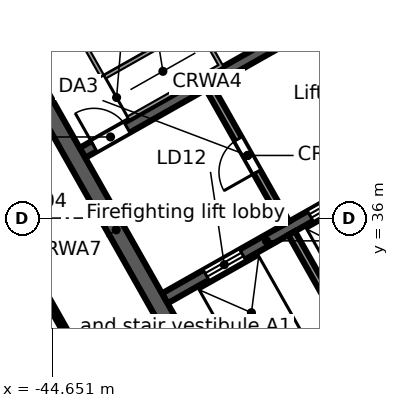
"""IFC4 building model, lengths in metres.
Left out: names, types, materials, properties, quantities, classifications, styles, units other than length and angle.
Written with IfcOpenShell. Run it as: python <this file> out.ifc"""

import sys

from ifc_helpers import new_model, si_unit, direction, frame, frame_2d, origin, place, context, subcontext, project, spatial, rectangle, extrude, element, fill, save


model = new_model("IFC4")
c1 = context("Model", 3, precision=1e-05, world=origin(), true_north=direction((0.0, 1.0)))
c2 = subcontext(c1, "Body", "Model", "MODEL_VIEW")
j1 = project(units=[si_unit("LENGTHUNIT", "METRE"), si_unit("PLANEANGLEUNIT", "RADIAN")], contexts=[c1])
p1 = place(None, origin())
s1 = spatial("IfcSite", under=j1, at=p1, CompositionType="ELEMENT")
p2 = place(p1, origin())
s2 = spatial("IfcBuilding", under=s1, at=p2, CompositionType="ELEMENT")
p3 = place(p2, frame((0.0, 0.0, 238.7)))
s3 = spatial("IfcBuildingStorey", under=s2, at=p3, CompositionType="ELEMENT", Elevation=238.7)
p4 = place(p3, frame((-0.046, 47.974, 0.0), z_axis=(0.0, 0.0, 1.0), x_axis=(-0.870356579543, -0.492421998337, 0.0)))
e1 = element("IfcWall", 1, at=p4, inside=s3, PredefinedType="STANDARD", context=c2, shape_type="SweptSolid", body=[
    extrude(rectangle(XDim=43.754, YDim=0.25, at=frame_2d((21.877, 0.0))), origin(), (0.0, 0.0, 1.0), 3.62),
])
p5 = place(p4, frame((41.061, 0.0, 0.8)))
e2 = element("IfcOpeningElement", 2, at=p5, cuts=e1, PredefinedType="OPENING", context=c2, shape_type="SweptSolid", body=[
    extrude(rectangle(XDim=2.4, YDim=2.2, at=frame_2d((1.2, 1.1))), frame((0.0, 0.135, 0.0), z_axis=(0.0, -1.0, 0.0), x_axis=(1.0, 0.0, 0.0)), (0.0, 0.0, 1.0), 0.27),
])
p6 = place(p4, frame((38.443, 0.0, 0.0)))
e3 = element("IfcOpeningElement", 3, at=p6, cuts=e1, PredefinedType="OPENING", context=c2, shape_type="SweptSolid", body=[
    extrude(rectangle(XDim=1.8, YDim=2.4, at=frame_2d((0.9, 1.2))), frame((0.0, 0.135, 0.0), z_axis=(0.0, -1.0, 0.0), x_axis=(1.0, 0.0, 0.0)), (0.0, 0.0, 1.0), 0.27),
])
p7 = place(p4, frame((35.225, 0.0, 0.8)))
e4 = element("IfcOpeningElement", 4, at=p7, cuts=e1, PredefinedType="OPENING", context=c2, shape_type="SweptSolid", body=[
    extrude(rectangle(XDim=2.4, YDim=2.2, at=frame_2d((1.2, 1.1))), frame((0.0, 0.135, 0.0), z_axis=(0.0, -1.0, 0.0), x_axis=(1.0, 0.0, 0.0)), (0.0, 0.0, 1.0), 0.27),
])
p8 = place(p4, frame((32.307, 0.0, 0.8)))
e5 = element("IfcOpeningElement", 5, at=p8, cuts=e1, PredefinedType="OPENING", context=c2, shape_type="SweptSolid", body=[
    extrude(rectangle(XDim=2.4, YDim=2.2, at=frame_2d((1.2, 1.1))), frame((0.0, 0.135, 0.0), z_axis=(0.0, -1.0, 0.0), x_axis=(1.0, 0.0, 0.0)), (0.0, 0.0, 1.0), 0.27),
])
p9 = place(p4, frame((29.688, 0.0, 0.0)))
e6 = element("IfcOpeningElement", 6, at=p9, cuts=e1, PredefinedType="OPENING", context=c2, shape_type="SweptSolid", body=[
    extrude(rectangle(XDim=1.8, YDim=2.4, at=frame_2d((0.9, 1.2))), frame((0.0, 0.135, 0.0), z_axis=(0.0, -1.0, 0.0), x_axis=(1.0, 0.0, 0.0)), (0.0, 0.0, 1.0), 0.27),
])
p10 = place(p4, frame((26.47, 0.0, 0.8)))
e7 = element("IfcOpeningElement", 7, at=p10, cuts=e1, PredefinedType="OPENING", context=c2, shape_type="SweptSolid", body=[
    extrude(rectangle(XDim=2.4, YDim=2.2, at=frame_2d((1.2, 1.1))), frame((0.0, 0.135, 0.0), z_axis=(0.0, -1.0, 0.0), x_axis=(1.0, 0.0, 0.0)), (0.0, 0.0, 1.0), 0.27),
])
p11 = place(p4, frame((23.552, 0.0, 0.8)))
e8 = element("IfcOpeningElement", 8, at=p11, cuts=e1, PredefinedType="OPENING", context=c2, shape_type="SweptSolid", body=[
    extrude(rectangle(XDim=2.4, YDim=2.2, at=frame_2d((1.2, 1.1))), frame((0.0, 0.135, 0.0), z_axis=(0.0, -1.0, 0.0), x_axis=(1.0, 0.0, 0.0)), (0.0, 0.0, 1.0), 0.27),
])
p12 = place(p4, frame((20.934, 0.0, 0.0)))
e9 = element("IfcOpeningElement", 9, at=p12, cuts=e1, PredefinedType="OPENING", context=c2, shape_type="SweptSolid", body=[
    extrude(rectangle(XDim=1.8, YDim=2.4, at=frame_2d((0.9, 1.2))), frame((0.0, 0.135, 0.0), z_axis=(0.0, -1.0, 0.0), x_axis=(1.0, 0.0, 0.0)), (0.0, 0.0, 1.0), 0.27),
])
p13 = place(p4, frame((17.716, 0.0, 0.8)))
e10 = element("IfcOpeningElement", 10, at=p13, cuts=e1, PredefinedType="OPENING", context=c2, shape_type="SweptSolid", body=[
    extrude(rectangle(XDim=2.4, YDim=2.2, at=frame_2d((1.2, 1.1))), frame((0.0, 0.135, 0.0), z_axis=(0.0, -1.0, 0.0), x_axis=(1.0, 0.0, 0.0)), (0.0, 0.0, 1.0), 0.27),
])
p14 = place(p4, frame((14.798, 0.0, 0.8)))
e11 = element("IfcOpeningElement", 11, at=p14, cuts=e1, PredefinedType="OPENING", context=c2, shape_type="SweptSolid", body=[
    extrude(rectangle(XDim=2.4, YDim=2.2, at=frame_2d((1.2, 1.1))), frame((0.0, 0.135, 0.0), z_axis=(0.0, -1.0, 0.0), x_axis=(1.0, 0.0, 0.0)), (0.0, 0.0, 1.0), 0.27),
])
p15 = place(p4, frame((12.179, 0.0, 0.0)))
e12 = element("IfcOpeningElement", 12, at=p15, cuts=e1, PredefinedType="OPENING", context=c2, shape_type="SweptSolid", body=[
    extrude(rectangle(XDim=1.8, YDim=2.4, at=frame_2d((0.9, 1.2))), frame((0.0, 0.135, 0.0), z_axis=(0.0, -1.0, 0.0), x_axis=(1.0, 0.0, 0.0)), (0.0, 0.0, 1.0), 0.27),
])
p16 = place(p4, frame((8.961, 0.0, 0.8)))
e13 = element("IfcOpeningElement", 13, at=p16, cuts=e1, PredefinedType="OPENING", context=c2, shape_type="SweptSolid", body=[
    extrude(rectangle(XDim=2.4, YDim=2.2, at=frame_2d((1.2, 1.1))), frame((0.0, 0.135, 0.0), z_axis=(0.0, -1.0, 0.0), x_axis=(1.0, 0.0, 0.0)), (0.0, 0.0, 1.0), 0.27),
])
p17 = place(p4, frame((6.043, 0.0, 0.8)))
e14 = element("IfcOpeningElement", 14, at=p17, cuts=e1, PredefinedType="OPENING", context=c2, shape_type="SweptSolid", body=[
    extrude(rectangle(XDim=2.4, YDim=2.2, at=frame_2d((1.2, 1.1))), frame((0.0, 0.135, 0.0), z_axis=(0.0, -1.0, 0.0), x_axis=(1.0, 0.0, 0.0)), (0.0, 0.0, 1.0), 0.27),
])
p18 = place(p4, frame((3.425, 0.0, 0.0)))
e15 = element("IfcOpeningElement", 15, at=p18, cuts=e1, PredefinedType="OPENING", context=c2, shape_type="SweptSolid", body=[
    extrude(rectangle(XDim=1.8, YDim=2.4, at=frame_2d((0.9, 1.2))), frame((0.0, 0.135, 0.0), z_axis=(0.0, -1.0, 0.0), x_axis=(1.0, 0.0, 0.0)), (0.0, 0.0, 1.0), 0.27),
])
p19 = place(p4, frame((0.207, 0.0, 0.8)))
e16 = element("IfcOpeningElement", 16, at=p19, cuts=e1, PredefinedType="OPENING", context=c2, shape_type="SweptSolid", body=[
    extrude(rectangle(XDim=2.4, YDim=2.2, at=frame_2d((1.2, 1.1))), frame((0.0, 0.135, 0.0), z_axis=(0.0, -1.0, 0.0), x_axis=(1.0, 0.0, 0.0)), (0.0, 0.0, 1.0), 0.27),
])
p20 = place(p3, frame((-58.732, 38.771, 0.0), z_axis=(0.0, 0.0, 1.0), x_axis=(0.870354824205, 0.492425100887, 0.0)))
e17 = element("IfcWall", 17, at=p20, inside=s3, PredefinedType="STANDARD", context=c2, shape_type="SweptSolid", body=[
    extrude(rectangle(XDim=64.006, YDim=0.25, at=frame_2d((32.003, 0.0))), origin(), (0.0, 0.0, 1.0), 3.62),
])
p21 = place(p20, frame((61.259, 0.0, 0.8)))
e18 = element("IfcOpeningElement", 18, at=p21, cuts=e17, PredefinedType="OPENING", context=c2, shape_type="SweptSolid", body=[
    extrude(rectangle(XDim=2.4, YDim=2.2, at=frame_2d((1.2, 1.1))), frame((0.0, 0.135, 0.0), z_axis=(0.0, -1.0, 0.0), x_axis=(1.0, 0.0, 0.0)), (0.0, 0.0, 1.0), 0.27),
])
p22 = place(p20, frame((58.216, 0.0, 0.8)))
e19 = element("IfcOpeningElement", 19, at=p22, cuts=e17, PredefinedType="OPENING", context=c2, shape_type="SweptSolid", body=[
    extrude(rectangle(XDim=2.4, YDim=2.2, at=frame_2d((1.2, 1.1))), frame((0.0, 0.135, 0.0), z_axis=(0.0, -1.0, 0.0), x_axis=(1.0, 0.0, 0.0)), (0.0, 0.0, 1.0), 0.27),
])
p23 = place(p20, frame((55.173, 0.0, 0.8)))
e20 = element("IfcOpeningElement", 20, at=p23, cuts=e17, PredefinedType="OPENING", context=c2, shape_type="SweptSolid", body=[
    extrude(rectangle(XDim=2.4, YDim=2.2, at=frame_2d((1.2, 1.1))), frame((0.0, 0.135, 0.0), z_axis=(0.0, -1.0, 0.0), x_axis=(1.0, 0.0, 0.0)), (0.0, 0.0, 1.0), 0.27),
])
p24 = place(p20, frame((52.129, 0.0, 0.8)))
e21 = element("IfcOpeningElement", 21, at=p24, cuts=e17, PredefinedType="OPENING", context=c2, shape_type="SweptSolid", body=[
    extrude(rectangle(XDim=2.4, YDim=2.2, at=frame_2d((1.2, 1.1))), frame((0.0, 0.135, 0.0), z_axis=(0.0, -1.0, 0.0), x_axis=(1.0, 0.0, 0.0)), (0.0, 0.0, 1.0), 0.27),
])
p25 = place(p20, frame((49.086, 0.0, 0.8)))
e22 = element("IfcOpeningElement", 22, at=p25, cuts=e17, PredefinedType="OPENING", context=c2, shape_type="SweptSolid", body=[
    extrude(rectangle(XDim=2.4, YDim=2.2, at=frame_2d((1.2, 1.1))), frame((0.0, 0.135, 0.0), z_axis=(0.0, -1.0, 0.0), x_axis=(1.0, 0.0, 0.0)), (0.0, 0.0, 1.0), 0.27),
])
p26 = place(p20, frame((46.043, 0.0, 0.8)))
e23 = element("IfcOpeningElement", 23, at=p26, cuts=e17, PredefinedType="OPENING", context=c2, shape_type="SweptSolid", body=[
    extrude(rectangle(XDim=2.4, YDim=2.2, at=frame_2d((1.2, 1.1))), frame((0.0, 0.135, 0.0), z_axis=(0.0, -1.0, 0.0), x_axis=(1.0, 0.0, 0.0)), (0.0, 0.0, 1.0), 0.27),
])
p27 = place(p20, frame((43.0, 0.0, 0.8)))
e24 = element("IfcOpeningElement", 24, at=p27, cuts=e17, PredefinedType="OPENING", context=c2, shape_type="SweptSolid", body=[
    extrude(rectangle(XDim=2.4, YDim=2.2, at=frame_2d((1.2, 1.1))), frame((0.0, 0.135, 0.0), z_axis=(0.0, -1.0, 0.0), x_axis=(1.0, 0.0, 0.0)), (0.0, 0.0, 1.0), 0.27),
])
p28 = place(p20, frame((39.956, 0.0, 0.8)))
e25 = element("IfcOpeningElement", 25, at=p28, cuts=e17, PredefinedType="OPENING", context=c2, shape_type="SweptSolid", body=[
    extrude(rectangle(XDim=2.4, YDim=2.2, at=frame_2d((1.2, 1.1))), frame((0.0, 0.135, 0.0), z_axis=(0.0, -1.0, 0.0), x_axis=(1.0, 0.0, 0.0)), (0.0, 0.0, 1.0), 0.27),
])
p29 = place(p20, frame((36.913, 0.0, 0.8)))
e26 = element("IfcOpeningElement", 26, at=p29, cuts=e17, PredefinedType="OPENING", context=c2, shape_type="SweptSolid", body=[
    extrude(rectangle(XDim=2.4, YDim=2.2, at=frame_2d((1.2, 1.1))), frame((0.0, 0.135, 0.0), z_axis=(0.0, -1.0, 0.0), x_axis=(1.0, 0.0, 0.0)), (0.0, 0.0, 1.0), 0.27),
])
p30 = place(p20, frame((33.87, 0.0, 0.8)))
e27 = element("IfcOpeningElement", 27, at=p30, cuts=e17, PredefinedType="OPENING", context=c2, shape_type="SweptSolid", body=[
    extrude(rectangle(XDim=2.4, YDim=2.2, at=frame_2d((1.2, 1.1))), frame((0.0, 0.135, 0.0), z_axis=(0.0, -1.0, 0.0), x_axis=(1.0, 0.0, 0.0)), (0.0, 0.0, 1.0), 0.27),
])
p31 = place(p20, frame((30.826, 0.0, 0.8)))
e28 = element("IfcOpeningElement", 28, at=p31, cuts=e17, PredefinedType="OPENING", context=c2, shape_type="SweptSolid", body=[
    extrude(rectangle(XDim=2.4, YDim=2.2, at=frame_2d((1.2, 1.1))), frame((0.0, 0.135, 0.0), z_axis=(0.0, -1.0, 0.0), x_axis=(1.0, 0.0, 0.0)), (0.0, 0.0, 1.0), 0.27),
])
p32 = place(p20, frame((27.783, 0.0, 0.8)))
e29 = element("IfcOpeningElement", 29, at=p32, cuts=e17, PredefinedType="OPENING", context=c2, shape_type="SweptSolid", body=[
    extrude(rectangle(XDim=2.4, YDim=2.2, at=frame_2d((1.2, 1.1))), frame((0.0, 0.135, 0.0), z_axis=(0.0, -1.0, 0.0), x_axis=(1.0, 0.0, 0.0)), (0.0, 0.0, 1.0), 0.27),
])
p33 = place(p20, frame((24.74, 0.0, 0.8)))
e30 = element("IfcOpeningElement", 30, at=p33, cuts=e17, PredefinedType="OPENING", context=c2, shape_type="SweptSolid", body=[
    extrude(rectangle(XDim=2.4, YDim=2.2, at=frame_2d((1.2, 1.1))), frame((0.0, 0.135, 0.0), z_axis=(0.0, -1.0, 0.0), x_axis=(1.0, 0.0, 0.0)), (0.0, 0.0, 1.0), 0.27),
])
p34 = place(p20, frame((21.696, 0.0, 0.8)))
e31 = element("IfcOpeningElement", 31, at=p34, cuts=e17, PredefinedType="OPENING", context=c2, shape_type="SweptSolid", body=[
    extrude(rectangle(XDim=2.4, YDim=2.2, at=frame_2d((1.2, 1.1))), frame((0.0, 0.135, 0.0), z_axis=(0.0, -1.0, 0.0), x_axis=(1.0, 0.0, 0.0)), (0.0, 0.0, 1.0), 0.27),
])
p35 = place(p20, frame((18.653, 0.0, 0.8)))
e32 = element("IfcOpeningElement", 32, at=p35, cuts=e17, PredefinedType="OPENING", context=c2, shape_type="SweptSolid", body=[
    extrude(rectangle(XDim=2.4, YDim=2.2, at=frame_2d((1.2, 1.1))), frame((0.0, 0.135, 0.0), z_axis=(0.0, -1.0, 0.0), x_axis=(1.0, 0.0, 0.0)), (0.0, 0.0, 1.0), 0.27),
])
p36 = place(p20, frame((15.61, 0.0, 0.8)))
e33 = element("IfcOpeningElement", 33, at=p36, cuts=e17, PredefinedType="OPENING", context=c2, shape_type="SweptSolid", body=[
    extrude(rectangle(XDim=2.4, YDim=2.2, at=frame_2d((1.2, 1.1))), frame((0.0, 0.135, 0.0), z_axis=(0.0, -1.0, 0.0), x_axis=(1.0, 0.0, 0.0)), (0.0, 0.0, 1.0), 0.27),
])
p37 = place(p20, frame((12.567, 0.0, 0.8)))
e34 = element("IfcOpeningElement", 34, at=p37, cuts=e17, PredefinedType="OPENING", context=c2, shape_type="SweptSolid", body=[
    extrude(rectangle(XDim=2.4, YDim=2.2, at=frame_2d((1.2, 1.1))), frame((0.0, 0.135, 0.0), z_axis=(0.0, -1.0, 0.0), x_axis=(1.0, 0.0, 0.0)), (0.0, 0.0, 1.0), 0.27),
])
p38 = place(p20, frame((9.523, 0.0, 0.8)))
e35 = element("IfcOpeningElement", 35, at=p38, cuts=e17, PredefinedType="OPENING", context=c2, shape_type="SweptSolid", body=[
    extrude(rectangle(XDim=2.4, YDim=2.2, at=frame_2d((1.2, 1.1))), frame((0.0, 0.135, 0.0), z_axis=(0.0, -1.0, 0.0), x_axis=(1.0, 0.0, 0.0)), (0.0, 0.0, 1.0), 0.27),
])
p39 = place(p20, frame((6.48, 0.0, 0.8)))
e36 = element("IfcOpeningElement", 36, at=p39, cuts=e17, PredefinedType="OPENING", context=c2, shape_type="SweptSolid", body=[
    extrude(rectangle(XDim=2.4, YDim=2.2, at=frame_2d((1.2, 1.1))), frame((0.0, 0.135, 0.0), z_axis=(0.0, -1.0, 0.0), x_axis=(1.0, 0.0, 0.0)), (0.0, 0.0, 1.0), 0.27),
])
p40 = place(p20, frame((3.437, 0.0, 0.8)))
e37 = element("IfcOpeningElement", 37, at=p40, cuts=e17, PredefinedType="OPENING", context=c2, shape_type="SweptSolid", body=[
    extrude(rectangle(XDim=2.4, YDim=2.2, at=frame_2d((1.2, 1.1))), frame((0.0, 0.135, 0.0), z_axis=(0.0, -1.0, 0.0), x_axis=(1.0, 0.0, 0.0)), (0.0, 0.0, 1.0), 0.27),
])
p41 = place(p20, frame((0.393, 0.0, 0.8)))
e38 = element("IfcOpeningElement", 38, at=p41, cuts=e17, PredefinedType="OPENING", context=c2, shape_type="SweptSolid", body=[
    extrude(rectangle(XDim=2.4, YDim=2.2, at=frame_2d((1.2, 1.1))), frame((0.0, 0.135, 0.0), z_axis=(0.0, -1.0, 0.0), x_axis=(1.0, 0.0, 0.0)), (0.0, 0.0, 1.0), 0.27),
])
p42 = place(p3, frame((-44.115, 26.507, 0.0), z_axis=(0.0, 0.0, 1.0), x_axis=(-0.857166583633, 0.515039268311, 0.0)))
e39 = element("IfcWall", 39, at=p42, inside=s3, PredefinedType="STANDARD", context=c2, shape_type="SweptSolid", body=[
    extrude(rectangle(XDim=17.106, YDim=0.25, at=frame_2d((8.553, 0.0))), origin(), (0.0, 0.0, 1.0), 3.62),
])
p43 = place(p42, frame((14.417, 0.0, 0.8)))
e40 = element("IfcOpeningElement", 40, at=p43, cuts=e39, PredefinedType="OPENING", context=c2, shape_type="SweptSolid", body=[
    extrude(rectangle(XDim=2.4, YDim=2.2, at=frame_2d((1.2, 1.1))), frame((0.0, 0.135, 0.0), z_axis=(0.0, -1.0, 0.0), x_axis=(1.0, 0.0, 0.0)), (0.0, 0.0, 1.0), 0.27),
])
p44 = place(p42, frame((11.584, 0.0, 0.8)))
e41 = element("IfcOpeningElement", 41, at=p44, cuts=e39, PredefinedType="OPENING", context=c2, shape_type="SweptSolid", body=[
    extrude(rectangle(XDim=2.4, YDim=2.2, at=frame_2d((1.2, 1.1))), frame((0.0, 0.135, 0.0), z_axis=(0.0, -1.0, 0.0), x_axis=(1.0, 0.0, 0.0)), (0.0, 0.0, 1.0), 0.27),
])
p45 = place(p42, frame((8.75, 0.0, 0.8)))
e42 = element("IfcOpeningElement", 42, at=p45, cuts=e39, PredefinedType="OPENING", context=c2, shape_type="SweptSolid", body=[
    extrude(rectangle(XDim=2.4, YDim=2.2, at=frame_2d((1.2, 1.1))), frame((0.0, 0.135, 0.0), z_axis=(0.0, -1.0, 0.0), x_axis=(1.0, 0.0, 0.0)), (0.0, 0.0, 1.0), 0.27),
])
p46 = place(p42, frame((5.917, 0.0, 0.8)))
e43 = element("IfcOpeningElement", 43, at=p46, cuts=e39, PredefinedType="OPENING", context=c2, shape_type="SweptSolid", body=[
    extrude(rectangle(XDim=2.4, YDim=2.2, at=frame_2d((1.2, 1.1))), frame((0.0, 0.135, 0.0), z_axis=(0.0, -1.0, 0.0), x_axis=(1.0, 0.0, 0.0)), (0.0, 0.0, 1.0), 0.27),
])
p47 = place(p42, frame((3.084, 0.0, 0.8)))
e44 = element("IfcOpeningElement", 44, at=p47, cuts=e39, PredefinedType="OPENING", context=c2, shape_type="SweptSolid", body=[
    extrude(rectangle(XDim=2.4, YDim=2.2, at=frame_2d((1.2, 1.1))), frame((0.0, 0.135, 0.0), z_axis=(0.0, -1.0, 0.0), x_axis=(1.0, 0.0, 0.0)), (0.0, 0.0, 1.0), 0.27),
])
p48 = place(p42, frame((0.25, 0.0, 0.8)))
e45 = element("IfcOpeningElement", 45, at=p48, cuts=e39, PredefinedType="OPENING", context=c2, shape_type="SweptSolid", body=[
    extrude(rectangle(XDim=2.4, YDim=2.2, at=frame_2d((1.2, 1.1))), frame((0.0, 0.135, 0.0), z_axis=(0.0, -1.0, 0.0), x_axis=(1.0, 0.0, 0.0)), (0.0, 0.0, 1.0), 0.27),
])
p49 = place(p3, frame((-39.825, 29.684, 0.0), z_axis=(0.0, 0.0, 1.0), x_axis=(0.870353598469, 0.492427267353, 0.0)))
e46 = element("IfcWall", 46, at=p49, inside=s3, PredefinedType="SOLIDWALL", context=c2, shape_type="SweptSolid", body=[
    extrude(rectangle(XDim=17.0, YDim=0.45, at=frame_2d((8.5, 0.0))), origin(), (0.0, 0.0, 1.0), 3.62),
])
p50 = place(p49, frame((7.2, 0.0, 0.0)))
e47 = element("IfcOpeningElement", 47, at=p50, cuts=e46, PredefinedType="OPENING", context=c2, shape_type="SweptSolid", body=[
    extrude(rectangle(XDim=1.2, YDim=2.1, at=frame_2d((0.6, 1.05))), frame((0.0, 0.235, 0.0), z_axis=(0.0, -1.0, 0.0), x_axis=(1.0, 0.0, 0.0)), (0.0, 0.0, 1.0), 0.47),
])
p51 = place(p3, frame((-41.687, 33.887, 0.0), z_axis=(0.0, 0.0, 1.0), x_axis=(0.870355736587, 0.49242348826, 0.0)))
e48 = element("IfcWall", 48, at=p51, inside=s3, PredefinedType="SOLIDWALL", context=c2, shape_type="SweptSolid", body=[
    extrude(rectangle(XDim=6.15, YDim=0.3, at=frame_2d((3.075, 0.0))), origin(), (0.0, 0.0, 1.0), 3.62),
])
p52 = place(p51, frame((1.25, 0.0, 0.0)))
e49 = element("IfcOpeningElement", 49, at=p52, cuts=e48, PredefinedType="OPENING", context=c2, shape_type="SweptSolid", body=[
    extrude(rectangle(XDim=1.1, YDim=2.1, at=frame_2d((0.55, 1.05))), frame((0.0, 0.16, 0.0), z_axis=(0.0, -1.0, 0.0), x_axis=(1.0, 0.0, 0.0)), (0.0, 0.0, 1.0), 0.32),
])
p53 = place(p51, frame((4.4, 0.0, 0.0)))
e50 = element("IfcOpeningElement", 50, at=p53, cuts=e48, PredefinedType="OPENING", context=c2, shape_type="SweptSolid", body=[
    extrude(rectangle(XDim=1.1, YDim=2.1, at=frame_2d((0.55, 1.05))), frame((0.0, 0.16, 0.0), z_axis=(0.0, -1.0, 0.0), x_axis=(1.0, 0.0, 0.0)), (0.0, 0.0, 1.0), 0.32),
])
p54 = place(p3, frame((-43.853, 37.717, 0.0), z_axis=(0.0, 0.0, 1.0), x_axis=(0.870360409231, 0.492415229297, 0.0)))
e51 = element("IfcWall", 51, at=p54, inside=s3, PredefinedType="SOLIDWALL", context=c2, shape_type="SweptSolid", body=[
    extrude(rectangle(XDim=7.55, YDim=0.3, at=frame_2d((3.775, 0.0))), origin(), (0.0, 0.0, 1.0), 3.62),
])
p55 = place(p54, frame((0.35, 0.0, 0.0)))
e52 = element("IfcOpeningElement", 52, at=p55, cuts=e51, PredefinedType="OPENING", context=c2, shape_type="SweptSolid", body=[
    extrude(rectangle(XDim=1.0, YDim=2.1, at=frame_2d((0.5, 1.05))), frame((0.0, 0.16, 0.0), z_axis=(0.0, -1.0, 0.0), x_axis=(1.0, 0.0, 0.0)), (0.0, 0.0, 1.0), 0.32),
])
p56 = place(p3, frame((-46.191, 41.392, 0.0), z_axis=(0.0, 0.0, 1.0), x_axis=(0.492421378713, -0.870356930107, 0.0)))
e53 = element("IfcWall", 53, at=p56, inside=s3, PredefinedType="SOLIDWALL", context=c2, shape_type="SweptSolid", body=[
    extrude(rectangle(XDim=13.1, YDim=0.45, at=frame_2d((6.55, 0.0))), origin(), (0.0, 0.0, 1.0), 3.62),
])
p57 = place(p3, frame((-38.349, 35.603, 0.0), z_axis=(0.0, 0.0, 1.0), x_axis=(0.492409653846, -0.870363563575, 0.0)))
e54 = element("IfcWall", 54, at=p57, inside=s3, PredefinedType="SOLIDWALL", context=c2, shape_type="SweptSolid", body=[
    extrude(rectangle(XDim=4.2, YDim=0.2, at=frame_2d((2.1, 0.0))), origin(), (0.0, 0.0, 1.0), 3.62),
])
p58 = place(p3, frame((-40.516, 39.433, 0.0), z_axis=(0.0, 0.0, 1.0), x_axis=(0.492453559952, -0.87033872216, 0.0)))
e55 = element("IfcWall", 55, at=p58, inside=s3, PredefinedType="PARTITIONING", context=c2, shape_type="SweptSolid", body=[
    extrude(rectangle(XDim=4.1, YDim=0.2, at=frame_2d((2.05, 0.0))), origin(), (0.0, 0.0, 1.0), 3.62),
])
p59 = place(p58, frame((1.55, 0.0, 0.0)))
e56 = element("IfcOpeningElement", 56, at=p59, cuts=e55, PredefinedType="OPENING", context=c2, shape_type="SweptSolid", body=[
    extrude(rectangle(XDim=1.0, YDim=2.1, at=frame_2d((0.5, 1.05))), frame((0.0, 0.11, 0.0), z_axis=(0.0, -1.0, 0.0), x_axis=(1.0, 0.0, 0.0)), (0.0, 0.0, 1.0), 0.22),
])
p60 = place(p3, frame((-48.567, 40.565, 0.0), z_axis=(0.0, 0.0, 1.0), x_axis=(0.492445070084, -0.870343525828, 0.0)))
e57 = element("IfcWall", 57, at=p60, inside=s3, PredefinedType="PARTITIONING", context=c2, shape_type="SweptSolid", body=[
    extrude(rectangle(XDim=9.5, YDim=0.125, at=frame_2d((4.75, 0.0))), origin(), (0.0, 0.0, 1.0), 2.9),
])
p61 = place(p60, frame((4.2, 0.0, 0.0)))
e58 = element("IfcOpeningElement", 58, at=p61, cuts=e57, PredefinedType="OPENING", context=c2, shape_type="SweptSolid", body=[
    extrude(rectangle(XDim=0.9, YDim=2.1, at=frame_2d((0.45, 1.05))), frame((0.0, 0.073, 0.0), z_axis=(0.0, -1.0, 0.0), x_axis=(1.0, 0.0, 0.0)), (0.0, 0.0, 1.0), 0.145),
])
p62 = place(p52, origin())
e59 = element("IfcDoor", 59, at=p62, inside=s3, OperationType="DOUBLE_DOOR_SLIDING", PredefinedType="DOOR", context=c2, shape_type="SweptSolid", body=[
    extrude(rectangle(XDim=1.1, YDim=2.1, at=frame_2d((0.55, 1.05))), frame((0.0, 0.025, 0.0), z_axis=(0.0, -1.0, 0.0), x_axis=(1.0, 0.0, 0.0)), (0.0, 0.0, 1.0), 0.05),
])
fill(e49, e59)
p63 = place(p53, origin())
e60 = element("IfcDoor", 60, at=p63, inside=s3, OperationType="DOUBLE_DOOR_SLIDING", PredefinedType="DOOR", context=c2, shape_type="SweptSolid", body=[
    extrude(rectangle(XDim=1.1, YDim=2.1, at=frame_2d((0.55, 1.05))), frame((0.0, 0.025, 0.0), z_axis=(0.0, -1.0, 0.0), x_axis=(1.0, 0.0, 0.0)), (0.0, 0.0, 1.0), 0.05),
])
fill(e50, e60)
p64 = place(p55, origin())
e61 = element("IfcDoor", 61, at=p64, inside=s3, OperationType="SINGLE_SWING_LEFT", PredefinedType="DOOR", context=c2, shape_type="SweptSolid", body=[
    extrude(rectangle(XDim=1.0, YDim=2.1, at=frame_2d((0.5, 1.05))), frame((0.0, 0.025, 0.0), z_axis=(0.0, -1.0, 0.0), x_axis=(1.0, 0.0, 0.0)), (0.0, 0.0, 1.0), 0.05),
])
fill(e52, e61)
p65 = place(p59, frame((1.0, 0.0, 0.0), z_axis=(0.0, 0.0, 1.0), x_axis=(-1.0, 0.0, 0.0)))
e62 = element("IfcDoor", 62, at=p65, inside=s3, OperationType="SINGLE_SWING_LEFT", PredefinedType="DOOR", context=c2, shape_type="SweptSolid", body=[
    extrude(rectangle(XDim=1.0, YDim=2.1, at=frame_2d((0.5, 1.05))), frame((0.0, 0.025, 0.0), z_axis=(0.0, -1.0, 0.0), x_axis=(1.0, 0.0, 0.0)), (0.0, 0.0, 1.0), 0.05),
])
fill(e56, e62)
save(model, sys.argv[1])
